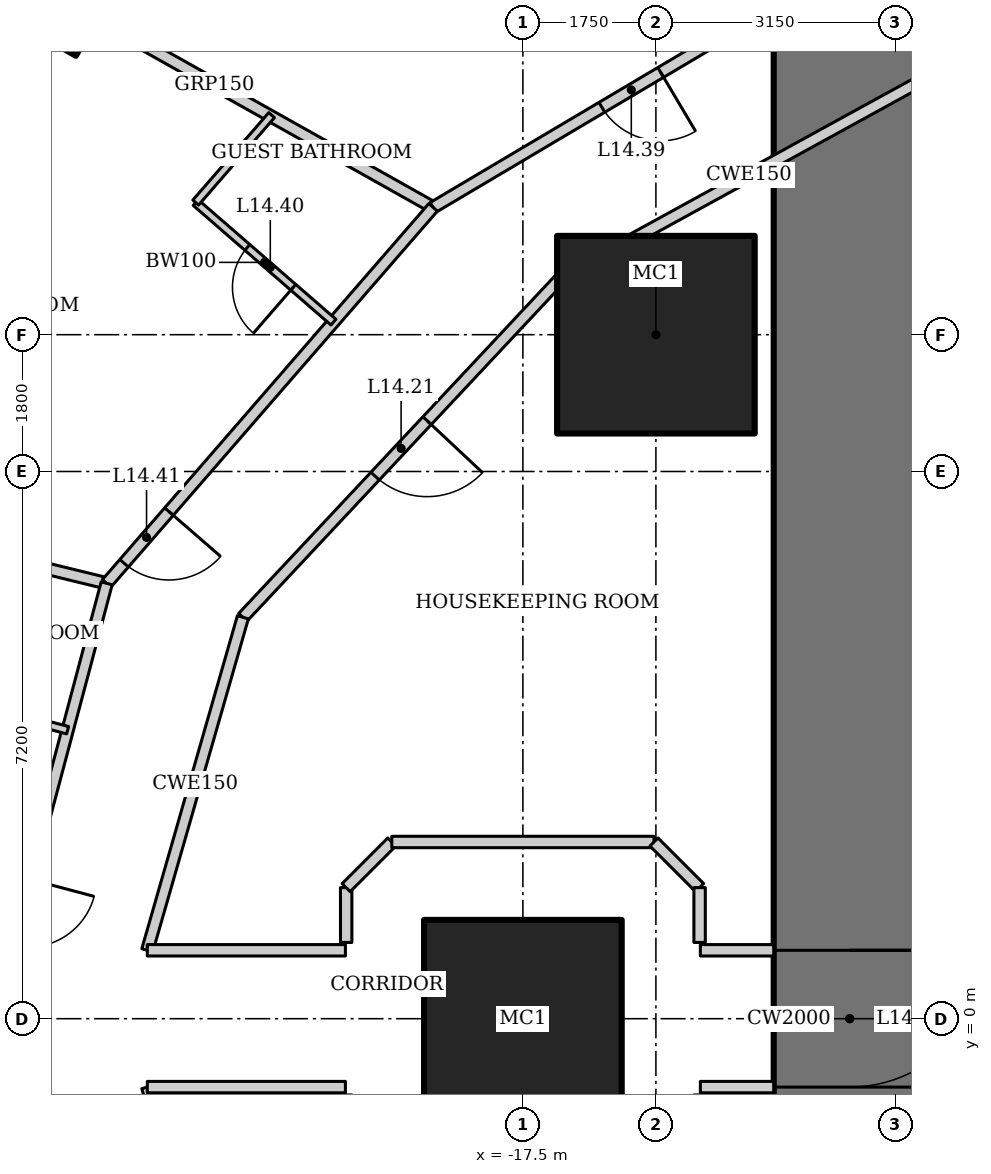
"""IFC4 building model, lengths in metres.
Left out: names, types, materials, properties, quantities, classifications, styles, units other than length and angle.
Written with IfcOpenShell. Run it as: python <this file> out.ifc"""

import sys

from ifc_helpers import new_model, si_unit, direction, frame, frame_2d, origin, origin_2d, place, context, subcontext, project, spatial, rectangle, hollow_rectangle, extrude, element, fill, save


model = new_model("IFC4")
c1 = context("Model", 3, precision=1e-05, world=origin(), true_north=direction((0.0, 1.0)))
c2 = subcontext(c1, "Body", "Model", "MODEL_VIEW")
j1 = project(units=[si_unit("LENGTHUNIT", "METRE"), si_unit("PLANEANGLEUNIT", "RADIAN")], contexts=[c1])
p1 = place(None, origin())
s1 = spatial("IfcSite", under=j1, at=p1, CompositionType="ELEMENT")
p2 = place(p1, origin())
s2 = spatial("IfcBuilding", under=s1, at=p2, CompositionType="ELEMENT")
p3 = place(p2, frame((0.0, 0.0, 65.8)))
s3 = spatial("IfcBuildingStorey", under=s2, at=p3, CompositionType="ELEMENT", Elevation=65.8)
for number, where, z_axis, x_axis in (
    (1, (-15.75, 9.0, 0.0), (0.0, 0.0, 1.0), (1.0, 0.0, 0.0)),
    (2, (-17.5, 0.0, 0.0), (0.0, 0.0, 1.0), (1.0, 0.0, 0.0)),
):
    element("IfcColumn", number, at=place(p3, frame(where, z_axis=z_axis, x_axis=x_axis)), inside=s3, PredefinedType="COLUMN", context=c2, shape_type="SweptSolid", body=[
        extrude(hollow_rectangle(XDim=2.6, YDim=2.6, WallThickness=0.13, at=origin_2d()), origin(), (0.0, 0.0, 1.0), 3.6),
    ])
p4 = place(p3, frame((-23.605, 13.489, 0.0), z_axis=(0.0, 0.0, 1.0), x_axis=(0.496139221777, 0.86824298017, 0.0)))
e3 = element("IfcColumn", 3, at=p4, inside=s3, PredefinedType="COLUMN", context=c2, shape_type="SweptSolid", body=[
    extrude(hollow_rectangle(XDim=1.2, YDim=1.2, WallThickness=0.12, at=origin_2d()), origin(), (0.0, 0.0, 1.0), 3.6),
])
p5 = place(p3, frame((-13.2, 13.0, 0.0), z_axis=(0.0, 0.0, 1.0), x_axis=(0.0, -1.0, 0.0)))
e4 = element("IfcWall", 4, at=p5, inside=s3, PredefinedType="SHEAR", context=c2, shape_type="SweptSolid", body=[
    extrude(rectangle(XDim=26.0, YDim=2.0, at=frame_2d((13.0, 0.0))), origin(), (0.0, 0.0, 1.0), 3.6),
])
p6 = place(p5, frame((12.1, 0.0, 0.0)))
e5 = element("IfcOpeningElement", 5, at=p6, cuts=e4, PredefinedType="OPENING", context=c2, shape_type="SweptSolid", body=[
    extrude(rectangle(XDim=1.8, YDim=2.1, at=frame_2d((0.9, 1.05))), frame((0.0, 1.01, 0.0), z_axis=(0.0, -1.0, 0.0), x_axis=(1.0, 0.0, 0.0)), (0.0, 0.0, 1.0), 2.02),
])
p7 = place(p3, frame((-24.435, 13.909, 0.0), z_axis=(0.0, 0.0, 1.0), x_axis=(0.871747379892, -0.489955616001, 0.0)))
e6 = element("IfcWall", 6, at=p7, inside=s3, PredefinedType="PARTITIONING", context=c2, shape_type="SweptSolid", body=[
    extrude(rectangle(XDim=6.6, YDim=0.15, at=frame_2d((3.3, 0.0))), origin(), (0.0, 0.0, 1.0), 2.693),
])
p8 = place(p3, frame((-29.222, 7.254, 0.0), z_axis=(0.0, 0.0, 1.0), x_axis=(0.971456980633, -0.237215797913, 0.0)))
e7 = element("IfcWall", 7, at=p8, inside=s3, PredefinedType="PARTITIONING", context=c2, shape_type="SweptSolid", body=[
    extrude(rectangle(XDim=6.429, YDim=0.15, at=frame_2d((3.215, 0.0))), origin(), (0.0, 0.0, 1.0), 2.332),
])
p9 = place(p3, frame((-13.357, 13.832, 0.0), z_axis=(0.0, 0.0, 1.0), x_axis=(-0.860147339762, -0.510045639036, 0.0)))
e8 = element("IfcWall", 8, at=p9, inside=s3, PredefinedType="PARTITIONING", context=c2, shape_type="SweptSolid", body=[
    extrude(rectangle(XDim=6.19, YDim=0.15, at=frame_2d((3.095, 0.0))), origin(), (0.0, 0.0, 1.0), 3.45),
])
p10 = place(p9, frame((2.708, 0.0, 0.0)))
e9 = element("IfcOpeningElement", 9, at=p10, cuts=e8, PredefinedType="OPENING", context=c2, shape_type="SweptSolid", body=[
    extrude(rectangle(XDim=0.9, YDim=2.1, at=frame_2d((0.45, 1.05))), frame((0.0, 0.085, 0.0), z_axis=(0.0, -1.0, 0.0), x_axis=(1.0, 0.0, 0.0)), (0.0, 0.0, 1.0), 0.17),
])
p11 = place(p3, frame((-18.681, 10.675, 0.0), z_axis=(0.0, 0.0, 1.0), x_axis=(-0.655599989166, -0.755108372491, 0.0)))
e10 = element("IfcWall", 10, at=p11, inside=s3, PredefinedType="PARTITIONING", context=c2, shape_type="SweptSolid", body=[
    extrude(rectangle(XDim=6.551, YDim=0.15, at=frame_2d((3.275, 0.0))), origin(), (0.0, 0.0, 1.0), 3.45),
])
p12 = place(p11, frame((5.301, 0.0, 0.0)))
e11 = element("IfcOpeningElement", 11, at=p12, cuts=e10, PredefinedType="OPENING", context=c2, shape_type="SweptSolid", body=[
    extrude(rectangle(XDim=0.9, YDim=2.1, at=frame_2d((0.45, 1.05))), frame((0.0, 0.085, 0.0), z_axis=(0.0, -1.0, 0.0), x_axis=(1.0, 0.0, 0.0)), (0.0, 0.0, 1.0), 0.17),
])
p13 = place(p3, frame((-22.976, 5.729, 0.0), z_axis=(0.0, 0.0, 1.0), x_axis=(-0.257083265334, -0.966389256296, 0.0)))
e12 = element("IfcWall", 12, at=p13, inside=s3, PredefinedType="PARTITIONING", context=c2, shape_type="SweptSolid", body=[
    extrude(rectangle(XDim=5.928, YDim=0.15, at=frame_2d((2.964, 0.0))), origin(), (0.0, 0.0, 1.0), 3.45),
])
p14 = place(p13, frame((4.023, 0.0, 0.0)))
e13 = element("IfcOpeningElement", 13, at=p14, cuts=e12, PredefinedType="OPENING", context=c2, shape_type="SweptSolid", body=[
    extrude(rectangle(XDim=0.9, YDim=2.1, at=frame_2d((0.45, 1.05))), frame((0.0, 0.085, 0.0), z_axis=(0.0, -1.0, 0.0), x_axis=(1.0, 0.0, 0.0)), (0.0, 0.0, 1.0), 0.17),
])
p15 = place(p3, frame((-24.5, 0.0, 0.0), z_axis=(0.0, 0.0, 1.0), x_axis=(0.257083265334, -0.966389256296, 0.0)))
e14 = element("IfcWall", 14, at=p15, inside=s3, PredefinedType="PARTITIONING", context=c2, shape_type="SweptSolid", body=[
    extrude(rectangle(XDim=5.928, YDim=0.15, at=frame_2d((2.964, 0.0))), origin(), (0.0, 0.0, 1.0), 3.45),
])
p16 = place(p15, frame((2.1, 0.0, 0.0)))
e15 = element("IfcOpeningElement", 15, at=p16, cuts=e14, PredefinedType="OPENING", context=c2, shape_type="SweptSolid", body=[
    extrude(rectangle(XDim=0.9, YDim=2.1, at=frame_2d((0.45, 1.05))), frame((0.0, 0.085, 0.0), z_axis=(0.0, -1.0, 0.0), x_axis=(1.0, 0.0, 0.0)), (0.0, 0.0, 1.0), 0.17),
])
p17 = place(p3, frame((-12.036, 12.464, 0.0), z_axis=(0.0, 0.0, 1.0), x_axis=(-0.876522084062, -0.481361647986, 0.0)))
e16 = element("IfcWall", 16, at=p17, inside=s3, PredefinedType="PARTITIONING", context=c2, shape_type="SweptSolid", body=[
    extrude(rectangle(XDim=5.687, YDim=0.15, at=frame_2d((2.844, 0.0))), origin(), (0.0, 0.0, 1.0), 3.45),
])
p18 = place(p3, frame((-17.021, 9.726, 0.0), z_axis=(0.0, 0.0, 1.0), x_axis=(-0.68365836236, -0.729802194828, 0.0)))
e17 = element("IfcWall", 17, at=p18, inside=s3, PredefinedType="PARTITIONING", context=c2, shape_type="SweptSolid", body=[
    extrude(rectangle(XDim=6.09, YDim=0.15, at=frame_2d((3.045, 0.0))), origin(), (0.0, 0.0, 1.0), 3.45),
])
p19 = place(p18, frame((2.545, 0.0, 0.0)))
e18 = element("IfcOpeningElement", 18, at=p19, cuts=e17, PredefinedType="OPENING", context=c2, shape_type="SweptSolid", body=[
    extrude(rectangle(XDim=1.0, YDim=2.1, at=frame_2d((0.5, 1.05))), frame((0.0, 0.085, 0.0), z_axis=(0.0, -1.0, 0.0), x_axis=(1.0, 0.0, 0.0)), (0.0, 0.0, 1.0), 0.17),
])
for number, where, z_axis, x_axis in (
    (19, (-21.184, 5.282, 0.0), (0.0, 0.0, 1.0), (-0.276, -0.961, 0.0)),
    (20, (-22.442, -0.9, 0.0), (0.0, 0.0, 1.0), (0.276, -0.961, 0.0)),
):
    element("IfcWall", number, at=place(p3, frame(where, z_axis=z_axis, x_axis=x_axis)), inside=s3, PredefinedType="PARTITIONING", context=c2, shape_type="SweptSolid", body=[
        extrude(rectangle(XDim=4.559, YDim=0.15, at=frame_2d((2.279, 0.0))), origin(), (0.0, 0.0, 1.0), 3.45),
    ])
p20 = place(p3, frame((-19.993, 9.165, 0.0), z_axis=(0.0, 0.0, 1.0), x_axis=(-0.755098052661, 0.655611875172, 0.0)))
e21 = element("IfcWall", 21, at=p20, inside=s3, PredefinedType="PARTITIONING", context=c2, shape_type="SweptSolid", body=[
    extrude(rectangle(XDim=2.4, YDim=0.1, at=frame_2d((1.2, 0.0))), origin(), (0.0, 0.0, 1.0), 3.45),
])
p21 = place(p20, frame((0.7, 0.0, 0.0)))
e22 = element("IfcOpeningElement", 22, at=p21, cuts=e21, PredefinedType="OPENING", context=c2, shape_type="SweptSolid", body=[
    extrude(rectangle(XDim=0.8, YDim=2.1, at=frame_2d((0.4, 1.05))), frame((0.0, 0.06, 0.0), z_axis=(0.0, -1.0, 0.0), x_axis=(1.0, 0.0, 0.0)), (0.0, 0.0, 1.0), 0.12),
])
p22 = place(p3, frame((-21.805, 10.738, 0.0), z_axis=(0.0, 0.0, 1.0), x_axis=(0.655528024617, 0.755170847518, 0.0)))
e23 = element("IfcWall", 23, at=p22, inside=s3, PredefinedType="PARTITIONING", context=c2, shape_type="SweptSolid", body=[
    extrude(rectangle(XDim=1.524, YDim=0.1, at=frame_2d((0.762, 0.0))), origin(), (0.0, 0.0, 1.0), 3.45),
])
p23 = place(p3, frame((-23.49, 3.796, 0.0), z_axis=(0.0, 0.0, 1.0), x_axis=(-0.96639514992, 0.257061109879, 0.0)))
e24 = element("IfcWall", 24, at=p23, inside=s3, PredefinedType="PARTITIONING", context=c2, shape_type="SweptSolid", body=[
    extrude(rectangle(XDim=2.4, YDim=0.1, at=frame_2d((1.2, 0.0))), origin(), (0.0, 0.0, 1.0), 3.45),
])
p24 = place(p23, frame((0.7, 0.0, 0.0)))
e25 = element("IfcOpeningElement", 25, at=p24, cuts=e24, PredefinedType="OPENING", context=c2, shape_type="SweptSolid", body=[
    extrude(rectangle(XDim=0.8, YDim=2.1, at=frame_2d((0.4, 1.05))), frame((0.0, 0.06, 0.0), z_axis=(0.0, -1.0, 0.0), x_axis=(1.0, 0.0, 0.0)), (0.0, 0.0, 1.0), 0.12),
])
p25 = place(p3, frame((-14.2, -0.9, 0.0), z_axis=(0.0, 0.0, 1.0), x_axis=(-1.0, 0.0, 0.0)))
e26 = element("IfcWall", 26, at=p25, inside=s3, PredefinedType="PARTITIONING", context=c2, shape_type="SweptSolid", body=[
    extrude(rectangle(XDim=0.965, YDim=0.15, at=frame_2d((0.482, 0.0))), origin(), (0.0, 0.0, 1.0), 3.45),
])
p26 = place(p3, frame((-19.835, -0.9, 0.0), z_axis=(0.0, 0.0, 1.0), x_axis=(-1.0, 0.0, 0.0)))
e27 = element("IfcWall", 27, at=p26, inside=s3, PredefinedType="PARTITIONING", context=c2, shape_type="SweptSolid", body=[
    extrude(rectangle(XDim=2.607, YDim=0.15, at=frame_2d((1.303, 0.0))), origin(), (0.0, 0.0, 1.0), 3.45),
])
p27 = place(p3, frame((-14.2, 0.9, 0.0), z_axis=(0.0, 0.0, 1.0), x_axis=(-1.0, 0.0, 0.0)))
e28 = element("IfcWall", 28, at=p27, inside=s3, PredefinedType="PARTITIONING", context=c2, shape_type="SweptSolid", body=[
    extrude(rectangle(XDim=0.965, YDim=0.15, at=frame_2d((0.482, 0.0))), origin(), (0.0, 0.0, 1.0), 3.45),
])
p28 = place(p3, frame((-19.835, 0.9, 0.0), z_axis=(0.0, 0.0, 1.0), x_axis=(-1.0, 0.0, 0.0)))
e29 = element("IfcWall", 29, at=p28, inside=s3, PredefinedType="PARTITIONING", context=c2, shape_type="SweptSolid", body=[
    extrude(rectangle(XDim=2.607, YDim=0.15, at=frame_2d((1.303, 0.0))), origin(), (0.0, 0.0, 1.0), 3.45),
])
p29 = place(p3, frame((-19.825, 1.003, 0.0), z_axis=(0.0, 0.0, 1.0), x_axis=(0.0, 1.0, 0.0)))
e30 = element("IfcWall", 30, at=p29, inside=s3, PredefinedType="PARTITIONING", context=c2, shape_type="SweptSolid", body=[
    extrude(rectangle(XDim=0.721, YDim=0.15, at=frame_2d((0.361, 0.0))), origin(), (0.0, 0.0, 1.0), 3.45),
])
p30 = place(p3, frame((-19.825, 1.725, 0.0), z_axis=(0.0, 0.0, 1.0), x_axis=(0.707106781187, 0.707106781187, 0.0)))
e31 = element("IfcWall", 31, at=p30, inside=s3, PredefinedType="PARTITIONING", context=c2, shape_type="SweptSolid", body=[
    extrude(rectangle(XDim=0.849, YDim=0.15, at=frame_2d((0.425, 0.0))), origin(), (0.0, 0.0, 1.0), 3.45),
])
p31 = place(p3, frame((-19.225, 2.325, 0.0), z_axis=(0.0, 0.0, 1.0), x_axis=(1.0, 0.0, 0.0)))
e32 = element("IfcWall", 32, at=p31, inside=s3, PredefinedType="PARTITIONING", context=c2, shape_type="SweptSolid", body=[
    extrude(rectangle(XDim=3.449, YDim=0.15, at=frame_2d((1.725, 0.0))), origin(), (0.0, 0.0, 1.0), 3.45),
])
p32 = place(p3, frame((-15.775, 2.325, 0.0), z_axis=(0.0, 0.0, 1.0), x_axis=(0.707106781187, -0.707106781187, 0.0)))
e33 = element("IfcWall", 33, at=p32, inside=s3, PredefinedType="PARTITIONING", context=c2, shape_type="SweptSolid", body=[
    extrude(rectangle(XDim=0.849, YDim=0.15, at=frame_2d((0.425, 0.0))), origin(), (0.0, 0.0, 1.0), 3.45),
])
p33 = place(p3, frame((-15.175, 1.725, 0.0), z_axis=(0.0, 0.0, 1.0), x_axis=(0.0, -1.0, 0.0)))
e34 = element("IfcWall", 34, at=p33, inside=s3, PredefinedType="PARTITIONING", context=c2, shape_type="SweptSolid", body=[
    extrude(rectangle(XDim=0.721, YDim=0.15, at=frame_2d((0.361, 0.0))), origin(), (0.0, 0.0, 1.0), 3.45),
])
p34 = place(p6, origin())
e35 = element("IfcDoor", 35, at=p34, inside=s3, OperationType="DOUBLE_DOOR_DOUBLE_SWING", PredefinedType="DOOR", context=c2, shape_type="SweptSolid", body=[
    extrude(rectangle(XDim=1.8, YDim=2.1, at=frame_2d((0.9, 1.05))), frame((0.0, 0.025, 0.0), z_axis=(0.0, -1.0, 0.0), x_axis=(1.0, 0.0, 0.0)), (0.0, 0.0, 1.0), 0.05),
])
fill(e5, e35)
p35 = place(p19, origin())
e36 = element("IfcDoor", 36, at=p35, inside=s3, OperationType="SINGLE_SWING_LEFT", PredefinedType="DOOR", context=c2, shape_type="SweptSolid", body=[
    extrude(rectangle(XDim=1.0, YDim=2.1, at=frame_2d((0.5, 1.05))), frame((0.0, 0.025, 0.0), z_axis=(0.0, -1.0, 0.0), x_axis=(1.0, 0.0, 0.0)), (0.0, 0.0, 1.0), 0.05),
])
fill(e18, e36)
p36 = place(p10, origin())
e37 = element("IfcDoor", 37, at=p36, inside=s3, OperationType="SINGLE_SWING_LEFT", PredefinedType="DOOR", context=c2, shape_type="SweptSolid", body=[
    extrude(rectangle(XDim=0.9, YDim=2.1, at=frame_2d((0.45, 1.05))), frame((0.0, 0.025, 0.0), z_axis=(0.0, -1.0, 0.0), x_axis=(1.0, 0.0, 0.0)), (0.0, 0.0, 1.0), 0.05),
])
fill(e9, e37)
p37 = place(p21, origin())
e38 = element("IfcDoor", 38, at=p37, inside=s3, OperationType="SINGLE_SWING_LEFT", PredefinedType="DOOR", context=c2, shape_type="SweptSolid", body=[
    extrude(rectangle(XDim=0.8, YDim=2.1, at=frame_2d((0.4, 1.05))), frame((0.0, 0.025, 0.0), z_axis=(0.0, -1.0, 0.0), x_axis=(1.0, 0.0, 0.0)), (0.0, 0.0, 1.0), 0.05),
])
fill(e22, e38)
p38 = place(p12, origin())
e39 = element("IfcDoor", 39, at=p38, inside=s3, OperationType="SINGLE_SWING_LEFT", PredefinedType="DOOR", context=c2, shape_type="SweptSolid", body=[
    extrude(rectangle(XDim=0.9, YDim=2.1, at=frame_2d((0.45, 1.05))), frame((0.0, 0.025, 0.0), z_axis=(0.0, -1.0, 0.0), x_axis=(1.0, 0.0, 0.0)), (0.0, 0.0, 1.0), 0.05),
])
fill(e11, e39)
save(model, sys.argv[1])
